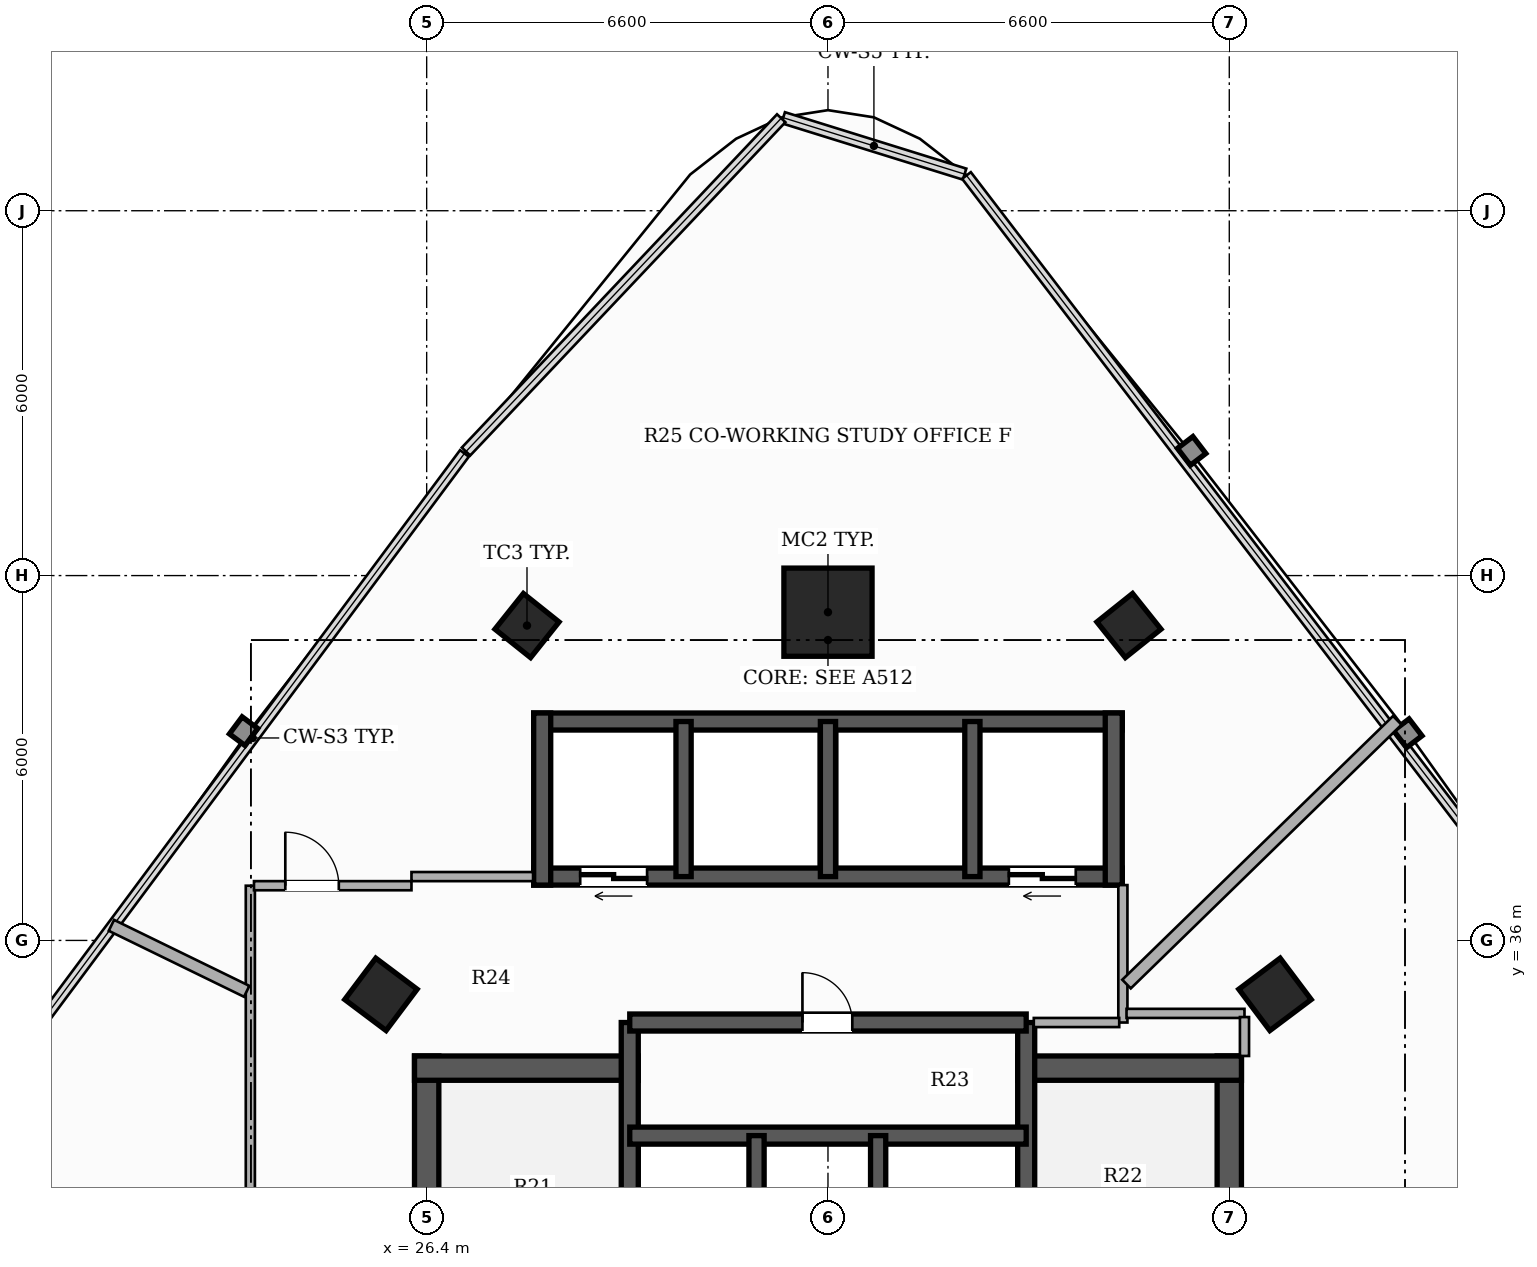
"""IFC4 building model, lengths in metres.
Left out: names, types, materials, properties, quantities, classifications, styles, units other than length and angle.
Written with IfcOpenShell. Run it as: python <this file> out.ifc"""

import sys

from ifc_helpers import new_model, si_unit, direction, frame, frame_2d, origin, origin_2d, place, context, subcontext, project, spatial, rectangle, hollow_rectangle, extrude, element, fill, save


model = new_model("IFC4")
c1 = context("Model", 3, precision=1e-05, world=origin(), true_north=direction((0.0, 1.0)))
c2 = subcontext(c1, "Body", "Model", "MODEL_VIEW")
j1 = project(units=[si_unit("LENGTHUNIT", "METRE"), si_unit("PLANEANGLEUNIT", "RADIAN")], contexts=[c1])
p1 = place(None, origin())
s1 = spatial("IfcSite", under=j1, at=p1, CompositionType="ELEMENT")
p2 = place(p1, origin())
s2 = spatial("IfcBuilding", under=s1, at=p2, CompositionType="ELEMENT")
p3 = place(p2, frame((0.0, 0.0, 110.0)))
s3 = spatial("IfcBuildingStorey", under=s2, at=p3, CompositionType="ELEMENT", Elevation=110.0)
p4 = place(p3, frame((26.4, 26.5, 0.0), z_axis=(0.0, 0.0, 1.0), x_axis=(0.0, 1.0, 0.0)))
e1 = element("IfcWall", 1, at=p4, inside=s3, PredefinedType="SHEAR", context=c2, shape_type="SweptSolid", body=[
    extrude(rectangle(XDim=7.6, YDim=0.4, at=frame_2d((3.8, 0.0))), origin(), (0.0, 0.0, 1.0), 3.3),
])
p5 = place(p3, frame((26.2, 33.9, 0.0), z_axis=(0.0, 0.0, 1.0), x_axis=(1.0, 0.0, 0.0)))
e2 = element("IfcWall", 2, at=p5, inside=s3, PredefinedType="SHEAR", context=c2, shape_type="SweptSolid", body=[
    extrude(rectangle(XDim=3.68, YDim=0.4, at=frame_2d((1.84, 0.0))), origin(), (0.0, 0.0, 1.0), 3.3),
])
p6 = place(p3, frame((39.6, 26.5, 0.0), z_axis=(0.0, 0.0, 1.0), x_axis=(0.0, 1.0, 0.0)))
e3 = element("IfcWall", 3, at=p6, inside=s3, PredefinedType="SHEAR", context=c2, shape_type="SweptSolid", body=[
    extrude(rectangle(XDim=7.6, YDim=0.4, at=frame_2d((3.8, 0.0))), origin(), (0.0, 0.0, 1.0), 3.3),
])
p7 = place(p3, frame((36.12, 33.9, 0.0), z_axis=(0.0, 0.0, 1.0), x_axis=(1.0, 0.0, 0.0)))
e4 = element("IfcWall", 4, at=p7, inside=s3, PredefinedType="SHEAR", context=c2, shape_type="SweptSolid", body=[
    extrude(rectangle(XDim=3.68, YDim=0.4, at=frame_2d((1.84, 0.0))), origin(), (0.0, 0.0, 1.0), 3.3),
])
p8 = place(p3, frame((29.74, 26.5, 0.0), z_axis=(0.0, 0.0, 1.0), x_axis=(0.0, 1.0, 0.0)))
e5 = element("IfcWall", 5, at=p8, inside=s3, PredefinedType="SHEAR", context=c2, shape_type="SweptSolid", body=[
    extrude(rectangle(XDim=8.15, YDim=0.28, at=frame_2d((4.075, 0.0))), origin(), (0.0, 0.0, 1.0), 3.3),
])
p9 = place(p8, frame((0.6, 0.0, 0.0)))
e6 = element("IfcOpeningElement", 6, at=p9, cuts=e5, PredefinedType="OPENING", context=c2, shape_type="SweptSolid", body=[
    extrude(rectangle(XDim=1.05, YDim=2.15, at=frame_2d((0.525, 1.075))), frame((0.0, 0.15, 0.0), z_axis=(0.0, -1.0, 0.0), x_axis=(1.0, 0.0, 0.0)), (0.0, 0.0, 1.0), 0.3),
])
p10 = place(p3, frame((36.26, 26.5, 0.0), z_axis=(0.0, 0.0, 1.0), x_axis=(0.0, 1.0, 0.0)))
e7 = element("IfcWall", 7, at=p10, inside=s3, PredefinedType="SHEAR", context=c2, shape_type="SweptSolid", body=[
    extrude(rectangle(XDim=8.15, YDim=0.28, at=frame_2d((4.075, 0.0))), origin(), (0.0, 0.0, 1.0), 3.3),
])
p11 = place(p10, frame((0.6, 0.0, 0.0)))
e8 = element("IfcOpeningElement", 8, at=p11, cuts=e7, PredefinedType="OPENING", context=c2, shape_type="SweptSolid", body=[
    extrude(rectangle(XDim=1.05, YDim=2.15, at=frame_2d((0.525, 1.075))), frame((0.0, 0.15, 0.0), z_axis=(0.0, -1.0, 0.0), x_axis=(1.0, 0.0, 0.0)), (0.0, 0.0, 1.0), 0.3),
])
p12 = place(p3, frame((29.74, 32.79, 0.0), z_axis=(0.0, 0.0, 1.0), x_axis=(1.0, 0.0, 0.0)))
e9 = element("IfcWall", 9, at=p12, inside=s3, PredefinedType="SHEAR", context=c2, shape_type="SweptSolid", body=[
    extrude(rectangle(XDim=6.52, YDim=0.28, at=frame_2d((3.26, 0.0))), origin(), (0.0, 0.0, 1.0), 3.3),
])
for number, where, z_axis, x_axis in (
    (10, (31.825, 29.89, 0.0), (0.0, 0.0, 1.0), (0.0, 1.0, 0.0)),
    (11, (33.825, 29.89, 0.0), (0.0, 0.0, 1.0), (0.0, 1.0, 0.0)),
):
    element("IfcWall", number, at=place(p3, frame(where, z_axis=z_axis, x_axis=x_axis)), inside=s3, PredefinedType="SHEAR", context=c2, shape_type="SweptSolid", body=[
        extrude(rectangle(XDim=2.9, YDim=0.25, at=frame_2d((1.45, 0.0))), origin(), (0.0, 0.0, 1.0), 3.3),
    ])
p13 = place(p3, frame((29.74, 34.65, 0.0), z_axis=(0.0, 0.0, 1.0), x_axis=(1.0, 0.0, 0.0)))
e12 = element("IfcWall", 12, at=p13, inside=s3, PredefinedType="SHEAR", context=c2, shape_type="SweptSolid", body=[
    extrude(rectangle(XDim=6.52, YDim=0.28, at=frame_2d((3.26, 0.0))), origin(), (0.0, 0.0, 1.0), 3.3),
])
p14 = place(p13, frame((2.84, 0.0, 0.0)))
e13 = element("IfcOpeningElement", 13, at=p14, cuts=e12, PredefinedType="OPENING", context=c2, shape_type="SweptSolid", body=[
    extrude(rectangle(XDim=0.82, YDim=2.1, at=frame_2d((0.41, 1.05))), frame((0.0, 0.15, 0.0), z_axis=(0.0, -1.0, 0.0), x_axis=(1.0, 0.0, 0.0)), (0.0, 0.0, 1.0), 0.3),
])
p15 = place(p3, frame((37.84, 37.05, 0.0), z_axis=(0.0, 0.0, 1.0), x_axis=(-1.0, 0.0, 0.0)))
e14 = element("IfcWall", 14, at=p15, inside=s3, PredefinedType="SHEAR", context=c2, shape_type="SweptSolid", body=[
    extrude(rectangle(XDim=9.68, YDim=0.28, at=frame_2d((4.84, 0.0))), origin(), (0.0, 0.0, 1.0), 3.3),
])
p16 = place(p15, frame((7.815, 0.0, 0.0)))
e15 = element("IfcOpeningElement", 15, at=p16, cuts=e14, PredefinedType="OPENING", context=c2, shape_type="SweptSolid", body=[
    extrude(rectangle(XDim=1.1, YDim=2.2, at=frame_2d((0.55, 1.1))), frame((0.0, 0.15, 0.0), z_axis=(0.0, -1.0, 0.0), x_axis=(1.0, 0.0, 0.0)), (0.0, 0.0, 1.0), 0.3),
])
p17 = place(p15, frame((0.765, 0.0, 0.0)))
e16 = element("IfcOpeningElement", 16, at=p17, cuts=e14, PredefinedType="OPENING", context=c2, shape_type="SweptSolid", body=[
    extrude(rectangle(XDim=1.1, YDim=2.2, at=frame_2d((0.55, 1.1))), frame((0.0, 0.15, 0.0), z_axis=(0.0, -1.0, 0.0), x_axis=(1.0, 0.0, 0.0)), (0.0, 0.0, 1.0), 0.3),
])
p18 = place(p3, frame((28.16, 39.6, 0.0), z_axis=(0.0, 0.0, 1.0), x_axis=(1.0, 0.0, 0.0)))
e17 = element("IfcWall", 17, at=p18, inside=s3, PredefinedType="SHEAR", context=c2, shape_type="SweptSolid", body=[
    extrude(rectangle(XDim=9.68, YDim=0.28, at=frame_2d((4.84, 0.0))), origin(), (0.0, 0.0, 1.0), 3.3),
])
for number, where, z_axis, x_axis in (
    (18, (28.3, 36.91, 0.0), (0.0, 0.0, 1.0), (0.0, 1.0, 0.0)),
    (19, (37.7, 36.91, 0.0), (0.0, 0.0, 1.0), (0.0, 1.0, 0.0)),
):
    element("IfcWall", number, at=place(p3, frame(where, z_axis=z_axis, x_axis=x_axis)), inside=s3, PredefinedType="SHEAR", context=c2, shape_type="SweptSolid", body=[
        extrude(rectangle(XDim=2.83, YDim=0.28, at=frame_2d((1.415, 0.0))), origin(), (0.0, 0.0, 1.0), 3.3),
    ])
for number, where, z_axis, x_axis in (
    (20, (30.625, 37.05, 0.0), (0.0, 0.0, 1.0), (0.0, 1.0, 0.0)),
    (21, (33.0, 37.05, 0.0), (0.0, 0.0, 1.0), (0.0, 1.0, 0.0)),
    (22, (35.375, 37.05, 0.0), (0.0, 0.0, 1.0), (0.0, 1.0, 0.0)),
):
    element("IfcWall", number, at=place(p3, frame(where, z_axis=z_axis, x_axis=x_axis)), inside=s3, PredefinedType="SHEAR", context=c2, shape_type="SweptSolid", body=[
        extrude(rectangle(XDim=2.55, YDim=0.25, at=frame_2d((1.275, 0.0))), origin(), (0.0, 0.0, 1.0), 3.3),
    ])
p19 = place(p3, frame((33.0, 41.398, 0.0), z_axis=(0.0, 0.0, 1.0), x_axis=(1.0, 0.0, 0.0)))
e23 = element("IfcColumn", 23, at=p19, inside=s3, PredefinedType="COLUMN", context=c2, shape_type="SweptSolid", body=[
    extrude(hollow_rectangle(XDim=1.45, YDim=1.45, WallThickness=0.045, at=origin_2d()), origin(), (0.0, 0.0, 1.0), 3.3),
])
for number, where, z_axis, x_axis in (
    (24, (25.648, 35.113, 0.0), (0.0, 0.0, 1.0), (0.6, 0.8, 0.0)),
    (25, (40.352, 35.113, 0.0), (0.0, 0.0, 1.0), (-0.6, 0.8, 0.0)),
):
    element("IfcColumn", number, at=place(p3, frame(where, z_axis=z_axis, x_axis=x_axis)), inside=s3, PredefinedType="COLUMN", context=c2, shape_type="SweptSolid", body=[
        extrude(hollow_rectangle(XDim=0.85, YDim=0.85, WallThickness=0.028, at=origin_2d()), origin(), (0.0, 0.0, 1.0), 3.3),
    ])
for number, where, z_axis, x_axis in (
    (26, (28.05, 41.178, 0.0), (0.0, 0.0, 1.0), (0.624, 0.782, 0.0)),
    (27, (37.95, 41.178, 0.0), (0.0, 0.0, 1.0), (-0.624, 0.782, 0.0)),
):
    element("IfcColumn", number, at=place(p3, frame(where, z_axis=z_axis, x_axis=x_axis)), inside=s3, PredefinedType="COLUMN", context=c2, shape_type="SweptSolid", body=[
        extrude(hollow_rectangle(XDim=0.75, YDim=0.75, WallThickness=0.025, at=origin_2d()), origin(), (0.0, 0.0, 1.0), 3.3),
    ])
p20 = place(p3, frame((37.85, 34.65, 0.0), z_axis=(0.0, 0.0, 1.0), x_axis=(0.0, 1.0, 0.0)))
e28 = element("IfcWall", 28, at=p20, inside=s3, PredefinedType="PARTITIONING", context=c2, shape_type="SweptSolid", body=[
    extrude(rectangle(XDim=2.26, YDim=0.15, at=frame_2d((1.13, 0.0))), origin(), (0.0, 0.0, 1.0), 3.06),
])
p21 = place(p3, frame((36.385, 34.65, 0.0), z_axis=(0.0, 0.0, 1.0), x_axis=(1.0, 0.0, 0.0)))
e29 = element("IfcWall", 29, at=p21, inside=s3, PredefinedType="PARTITIONING", context=c2, shape_type="SweptSolid", body=[
    extrude(rectangle(XDim=1.405, YDim=0.15, at=frame_2d((0.703, 0.0))), origin(), (0.0, 0.0, 1.0), 2.425),
])
p22 = place(p3, frame((23.5, 14.06, 0.0), z_axis=(0.0, 0.0, 1.0), x_axis=(0.0, 1.0, 0.0)))
e30 = element("IfcWall", 30, at=p22, inside=s3, PredefinedType="PARTITIONING", context=c2, shape_type="SweptSolid", body=[
    extrude(rectangle(XDim=22.84, YDim=0.15, at=frame_2d((11.42, 0.0))), origin(), (0.0, 0.0, 1.0), 2.413),
])
p23 = place(p22, frame((13.373, 0.0, 0.0)))
e31 = element("IfcOpeningElement", 31, at=p23, cuts=e30, PredefinedType="OPENING", context=c2, shape_type="SweptSolid", body=[
    extrude(rectangle(XDim=0.88, YDim=2.1, at=frame_2d((0.44, 1.05))), frame((0.0, 0.085, 0.0), z_axis=(0.0, -1.0, 0.0), x_axis=(1.0, 0.0, 0.0)), (0.0, 0.0, 1.0), 0.17),
])
p24 = place(p22, frame((3.002, 0.0, 0.0)))
e32 = element("IfcOpeningElement", 32, at=p24, cuts=e30, PredefinedType="OPENING", context=c2, shape_type="SweptSolid", body=[
    extrude(rectangle(XDim=0.92, YDim=2.15, at=frame_2d((0.46, 1.075))), frame((0.0, 0.085, 0.0), z_axis=(0.0, -1.0, 0.0), x_axis=(1.0, 0.0, 0.0)), (0.0, 0.0, 1.0), 0.17),
])
p25 = place(p3, frame((23.56, 36.9, 0.0), z_axis=(0.0, 0.0, 1.0), x_axis=(1.0, 0.0, 0.0)))
e33 = element("IfcWall", 33, at=p25, inside=s3, PredefinedType="PARTITIONING", context=c2, shape_type="SweptSolid", body=[
    extrude(rectangle(XDim=2.59, YDim=0.15, at=frame_2d((1.295, 0.0))), origin(), (0.0, 0.0, 1.0), 2.413),
])
p26 = place(p25, frame((0.515, 0.0, 0.0)))
e34 = element("IfcOpeningElement", 34, at=p26, cuts=e33, PredefinedType="OPENING", context=c2, shape_type="SweptSolid", body=[
    extrude(rectangle(XDim=0.88, YDim=2.1, at=frame_2d((0.44, 1.05))), frame((0.0, 0.085, 0.0), z_axis=(0.0, -1.0, 0.0), x_axis=(1.0, 0.0, 0.0)), (0.0, 0.0, 1.0), 0.17),
])
p27 = place(p3, frame((26.15, 37.05, 0.0), z_axis=(0.0, 0.0, 1.0), x_axis=(1.0, 0.0, 0.0)))
e35 = element("IfcWall", 35, at=p27, inside=s3, PredefinedType="PARTITIONING", context=c2, shape_type="SweptSolid", body=[
    extrude(rectangle(XDim=2.0, YDim=0.15, at=frame_2d((1.0, 0.0))), origin(), (0.0, 0.0, 1.0), 2.413),
])
p28 = place(p3, frame((37.91, 34.8, 0.0), z_axis=(0.0, 0.0, 1.0), x_axis=(1.0, 0.0, 0.0)))
e36 = element("IfcWall", 36, at=p28, inside=s3, PredefinedType="PARTITIONING", context=c2, shape_type="SweptSolid", body=[
    extrude(rectangle(XDim=1.94, YDim=0.15, at=frame_2d((0.97, 0.0))), origin(), (0.0, 0.0, 1.0), 2.721),
])
p29 = place(p3, frame((39.85, 34.74, 0.0), z_axis=(0.0, 0.0, 1.0), x_axis=(0.0, -1.0, 0.0)))
e37 = element("IfcWall", 37, at=p29, inside=s3, PredefinedType="PARTITIONING", context=c2, shape_type="SweptSolid", body=[
    extrude(rectangle(XDim=0.64, YDim=0.15, at=frame_2d((0.32, 0.0))), origin(), (0.0, 0.0, 1.0), 2.721),
])
p30 = place(p3, frame((21.215, 36.248, 0.0), z_axis=(0.0, 0.0, 1.0), x_axis=(0.898821522371, -0.438314808012, 0.0)))
e38 = element("IfcWall", 38, at=p30, inside=s3, PredefinedType="PARTITIONING", context=c2, shape_type="SweptSolid", body=[
    extrude(rectangle(XDim=2.475, YDim=0.2, at=frame_2d((1.238, 0.0))), origin(), (0.0, 0.0, 1.0), 3.06),
])
p31 = place(p3, frame((37.91, 35.282, 0.0), z_axis=(0.0, 0.0, 1.0), x_axis=(0.716392659664, 0.697697324905, 0.0)))
e39 = element("IfcWall", 39, at=p31, inside=s3, PredefinedType="PARTITIONING", context=c2, shape_type="SweptSolid", body=[
    extrude(rectangle(XDim=6.216, YDim=0.2, at=frame_2d((3.108, 0.0))), origin(), (0.0, 0.0, 1.0), 2.413),
])
p32 = place(p16, origin())
e40 = element("IfcDoor", 40, at=p32, inside=s3, OperationType="DOUBLE_DOOR_SLIDING", PredefinedType="DOOR", context=c2, shape_type="SweptSolid", body=[
    extrude(rectangle(XDim=1.1, YDim=2.2, at=frame_2d((0.55, 1.1))), frame((0.0, 0.025, 0.0), z_axis=(0.0, -1.0, 0.0), x_axis=(1.0, 0.0, 0.0)), (0.0, 0.0, 1.0), 0.05),
])
fill(e15, e40)
p33 = place(p17, origin())
e41 = element("IfcDoor", 41, at=p33, inside=s3, OperationType="DOUBLE_DOOR_SLIDING", PredefinedType="DOOR", context=c2, shape_type="SweptSolid", body=[
    extrude(rectangle(XDim=1.1, YDim=2.2, at=frame_2d((0.55, 1.1))), frame((0.0, 0.025, 0.0), z_axis=(0.0, -1.0, 0.0), x_axis=(1.0, 0.0, 0.0)), (0.0, 0.0, 1.0), 0.05),
])
fill(e16, e41)
p34 = place(p14, origin())
e42 = element("IfcDoor", 42, at=p34, inside=s3, OperationType="SINGLE_SWING_LEFT", PredefinedType="DOOR", context=c2, shape_type="SweptSolid", body=[
    extrude(rectangle(XDim=0.82, YDim=2.1, at=frame_2d((0.41, 1.05))), frame((0.0, 0.025, 0.0), z_axis=(0.0, -1.0, 0.0), x_axis=(1.0, 0.0, 0.0)), (0.0, 0.0, 1.0), 0.05),
])
fill(e13, e42)
p35 = place(p26, origin())
e43 = element("IfcDoor", 43, at=p35, inside=s3, OperationType="SINGLE_SWING_LEFT", PredefinedType="DOOR", context=c2, shape_type="SweptSolid", body=[
    extrude(rectangle(XDim=0.88, YDim=2.1, at=frame_2d((0.44, 1.05))), frame((0.0, 0.025, 0.0), z_axis=(0.0, -1.0, 0.0), x_axis=(1.0, 0.0, 0.0)), (0.0, 0.0, 1.0), 0.05),
])
fill(e34, e43)
save(model, sys.argv[1])
